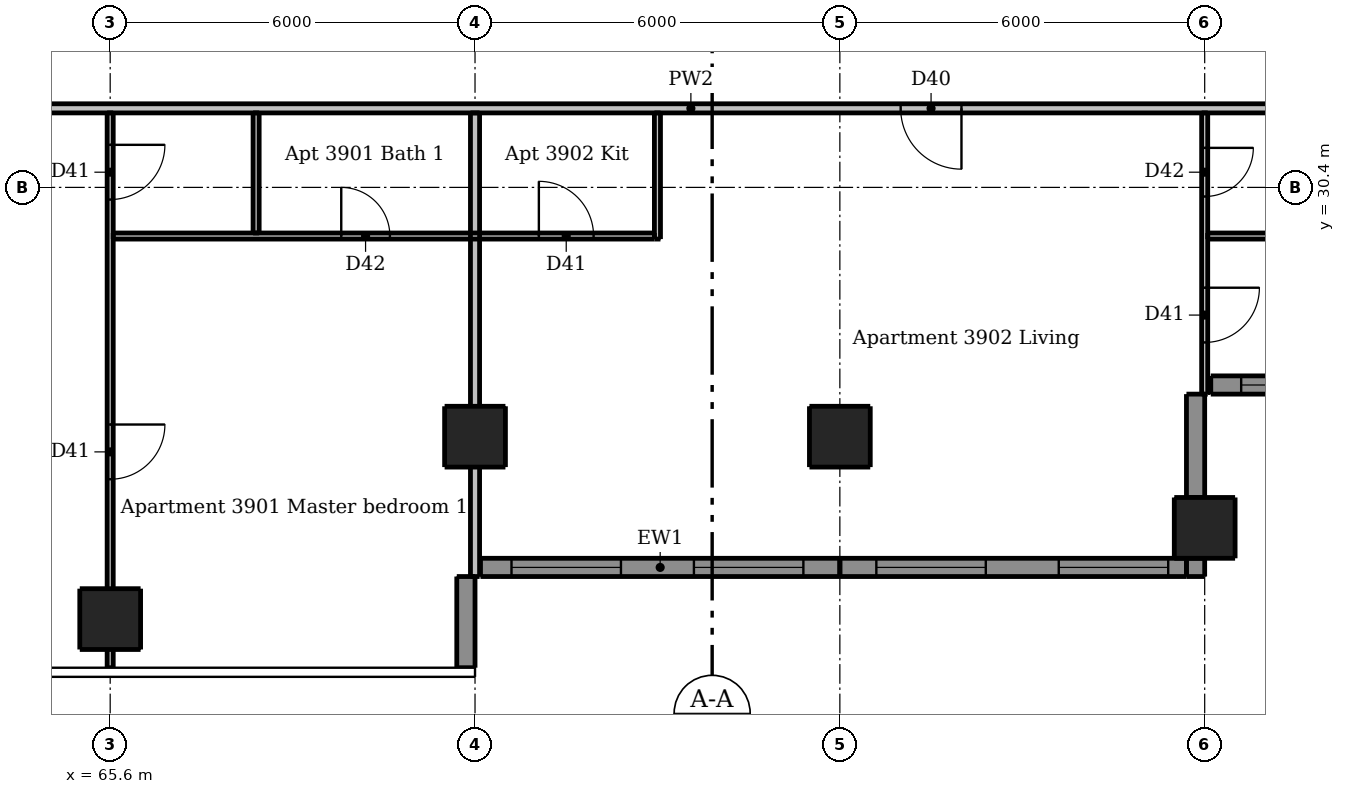
"""IFC4 building model, lengths in metres.
Left out: names, types, materials, properties, quantities, classifications, styles, units other than length and angle.
Written with IfcOpenShell. Run it as: python <this file> out.ifc"""

import sys

from ifc_helpers import new_model, si_unit, direction, frame, frame_2d, origin, origin_2d, place, context, subcontext, project, spatial, rectangle, extrude, element, fill, save


model = new_model("IFC4")
c1 = context("Model", 3, precision=1e-05, world=origin(), true_north=direction((0.0, 1.0)))
c2 = subcontext(c1, "Body", "Model", "MODEL_VIEW")
j1 = project(units=[si_unit("LENGTHUNIT", "METRE"), si_unit("PLANEANGLEUNIT", "RADIAN")], contexts=[c1])
p1 = place(None, origin())
s1 = spatial("IfcSite", under=j1, at=p1, CompositionType="ELEMENT")
p2 = place(p1, origin())
s2 = spatial("IfcBuilding", under=s1, at=p2, CompositionType="ELEMENT")
p3 = place(p2, frame((0.0, 0.0, 147.1)))
s3 = spatial("IfcBuildingStorey", under=s2, at=p3, CompositionType="ELEMENT", Elevation=147.1)
for number, where, z_axis, x_axis in (
    (1, (65.6, 23.3, 0.0), (0.0, 0.0, 1.0), (1.0, 0.0, 0.0)),
    (2, (71.6, 26.3, 0.0), (0.0, 0.0, 1.0), (1.0, 0.0, 0.0)),
    (3, (77.6, 26.3, 0.0), (0.0, 0.0, 1.0), (1.0, 0.0, 0.0)),
):
    element("IfcColumn", number, at=place(p3, frame(where, z_axis=z_axis, x_axis=x_axis)), inside=s3, PredefinedType="COLUMN", context=c2, shape_type="SweptSolid", body=[
        extrude(rectangle(XDim=1.0, YDim=1.0, at=origin_2d()), origin(), (0.0, 0.0, 1.0), 3.0),
    ])
p4 = place(p3, frame((83.6, 24.8, 0.0), z_axis=(0.0, 0.0, 1.0), x_axis=(1.0, 0.0, 0.0)))
e4 = element("IfcColumn", 4, at=p4, inside=s3, PredefinedType="COLUMN", context=c2, shape_type="SweptSolid", body=[
    extrude(rectangle(XDim=1.0, YDim=1.0, at=origin_2d()), origin(), (0.0, 0.0, 1.0), 3.3),
])
p5 = place(p3, frame((71.45, 22.5, 0.0), z_axis=(0.0, 0.0, 1.0), x_axis=(0.0, 1.0, 0.0)))
e5 = element("IfcWall", 5, at=p5, inside=s3, PredefinedType="SOLIDWALL", context=c2, shape_type="SweptSolid", body=[
    extrude(rectangle(XDim=1.5, YDim=0.3, at=frame_2d((0.75, 0.0))), origin(), (0.0, 0.0, 1.0), 3.0),
])
p6 = place(p3, frame((83.45, 24.0, 0.0), z_axis=(0.0, 0.0, 1.0), x_axis=(0.0, 1.0, 0.0)))
e6 = element("IfcWall", 6, at=p6, inside=s3, PredefinedType="SOLIDWALL", context=c2, shape_type="SweptSolid", body=[
    extrude(rectangle(XDim=0.3, YDim=0.3, at=frame_2d((0.15, 0.0))), origin(), (0.0, 0.0, 1.0), 3.0),
])
p7 = place(p3, frame((83.45, 25.3, 0.0), z_axis=(0.0, 0.0, 1.0), x_axis=(0.0, 1.0, 0.0)))
e7 = element("IfcWall", 7, at=p7, inside=s3, PredefinedType="SOLIDWALL", context=c2, shape_type="SweptSolid", body=[
    extrude(rectangle(XDim=1.7, YDim=0.3, at=frame_2d((0.85, 0.0))), origin(), (0.0, 0.0, 1.0), 3.0),
])
p8 = place(p3, frame((71.69, 24.15, 0.0), z_axis=(0.0, 0.0, 1.0), x_axis=(1.0, 0.0, 0.0)))
e8 = element("IfcWall", 8, at=p8, inside=s3, PredefinedType="SOLIDWALL", context=c2, shape_type="SweptSolid", body=[
    extrude(rectangle(XDim=5.91, YDim=0.3, at=frame_2d((2.955, 0.0))), origin(), (0.0, 0.0, 1.0), 3.0),
])
p9 = place(p8, frame((0.51, 0.0, 0.15)))
e9 = element("IfcOpeningElement", 9, at=p9, cuts=e8, PredefinedType="OPENING", context=c2, shape_type="SweptSolid", body=[
    extrude(rectangle(XDim=1.8, YDim=2.1, at=frame_2d((0.9, 1.05))), frame((0.0, 0.16, 0.0), z_axis=(0.0, -1.0, 0.0), x_axis=(1.0, 0.0, 0.0)), (0.0, 0.0, 1.0), 0.32),
])
p10 = place(p8, frame((3.51, 0.0, 0.15)))
e10 = element("IfcOpeningElement", 10, at=p10, cuts=e8, PredefinedType="OPENING", context=c2, shape_type="SweptSolid", body=[
    extrude(rectangle(XDim=1.8, YDim=2.1, at=frame_2d((0.9, 1.05))), frame((0.0, 0.16, 0.0), z_axis=(0.0, -1.0, 0.0), x_axis=(1.0, 0.0, 0.0)), (0.0, 0.0, 1.0), 0.32),
])
p11 = place(p3, frame((77.6, 24.15, 0.0), z_axis=(0.0, 0.0, 1.0), x_axis=(1.0, 0.0, 0.0)))
e11 = element("IfcWall", 11, at=p11, inside=s3, PredefinedType="SOLIDWALL", context=c2, shape_type="SweptSolid", body=[
    extrude(rectangle(XDim=5.7, YDim=0.3, at=frame_2d((2.85, 0.0))), origin(), (0.0, 0.0, 1.0), 3.0),
])
p12 = place(p11, frame((0.6, 0.0, 0.15)))
e12 = element("IfcOpeningElement", 12, at=p12, cuts=e11, PredefinedType="OPENING", context=c2, shape_type="SweptSolid", body=[
    extrude(rectangle(XDim=1.8, YDim=2.1, at=frame_2d((0.9, 1.05))), frame((0.0, 0.16, 0.0), z_axis=(0.0, -1.0, 0.0), x_axis=(1.0, 0.0, 0.0)), (0.0, 0.0, 1.0), 0.32),
])
p13 = place(p11, frame((3.6, 0.0, 0.15)))
e13 = element("IfcOpeningElement", 13, at=p13, cuts=e11, PredefinedType="OPENING", context=c2, shape_type="SweptSolid", body=[
    extrude(rectangle(XDim=1.8, YDim=2.1, at=frame_2d((0.9, 1.05))), frame((0.0, 0.16, 0.0), z_axis=(0.0, -1.0, 0.0), x_axis=(1.0, 0.0, 0.0)), (0.0, 0.0, 1.0), 0.32),
])
p14 = place(p3, frame((83.7, 27.15, 0.0), z_axis=(0.0, 0.0, 1.0), x_axis=(1.0, 0.0, 0.0)))
e14 = element("IfcWall", 14, at=p14, inside=s3, PredefinedType="SOLIDWALL", context=c2, shape_type="SweptSolid", body=[
    extrude(rectangle(XDim=5.79, YDim=0.3, at=frame_2d((2.895, 0.0))), origin(), (0.0, 0.0, 1.0), 3.0),
])
p15 = place(p14, frame((0.5, 0.0, 0.15)))
e15 = element("IfcOpeningElement", 15, at=p15, cuts=e14, PredefinedType="OPENING", context=c2, shape_type="SweptSolid", body=[
    extrude(rectangle(XDim=1.8, YDim=2.1, at=frame_2d((0.9, 1.05))), frame((0.0, 0.16, 0.0), z_axis=(0.0, -1.0, 0.0), x_axis=(1.0, 0.0, 0.0)), (0.0, 0.0, 1.0), 0.32),
])
p16 = place(p14, frame((3.5, 0.0, 0.15)))
e16 = element("IfcOpeningElement", 16, at=p16, cuts=e14, PredefinedType="OPENING", context=c2, shape_type="SweptSolid", body=[
    extrude(rectangle(XDim=1.8, YDim=2.1, at=frame_2d((0.9, 1.05))), frame((0.0, 0.16, 0.0), z_axis=(0.0, -1.0, 0.0), x_axis=(1.0, 0.0, 0.0)), (0.0, 0.0, 1.0), 0.32),
])
p17 = place(p3, frame((65.6, 31.625, 0.0), z_axis=(0.0, 0.0, 1.0), x_axis=(0.0, -1.0, 0.0)))
e17 = element("IfcWall", 17, at=p17, inside=s3, PredefinedType="PARTITIONING", context=c2, shape_type="SweptSolid", body=[
    extrude(rectangle(XDim=9.125, YDim=0.1, at=frame_2d((4.562, 0.0))), origin(), (0.0, 0.0, 1.0), 2.466),
])
p18 = place(p17, frame((0.525, 0.0, 0.0)))
e18 = element("IfcOpeningElement", 18, at=p18, cuts=e17, PredefinedType="OPENING", context=c2, shape_type="SweptSolid", body=[
    extrude(rectangle(XDim=0.9, YDim=2.1, at=frame_2d((0.45, 1.05))), frame((0.0, 0.06, 0.0), z_axis=(0.0, -1.0, 0.0), x_axis=(1.0, 0.0, 0.0)), (0.0, 0.0, 1.0), 0.12),
])
p19 = place(p17, frame((5.125, 0.0, 0.0)))
e19 = element("IfcOpeningElement", 19, at=p19, cuts=e17, PredefinedType="OPENING", context=c2, shape_type="SweptSolid", body=[
    extrude(rectangle(XDim=0.9, YDim=2.1, at=frame_2d((0.45, 1.05))), frame((0.0, 0.06, 0.0), z_axis=(0.0, -1.0, 0.0), x_axis=(1.0, 0.0, 0.0)), (0.0, 0.0, 1.0), 0.12),
])
p20 = place(p3, frame((68.0, 29.65, 0.0), z_axis=(0.0, 0.0, 1.0), x_axis=(0.0, 1.0, 0.0)))
e20 = element("IfcWall", 20, at=p20, inside=s3, PredefinedType="PARTITIONING", context=c2, shape_type="SweptSolid", body=[
    extrude(rectangle(XDim=1.975, YDim=0.1, at=frame_2d((0.988, 0.0))), origin(), (0.0, 0.0, 1.0), 3.0),
])
p21 = place(p3, frame((74.6, 29.55, 0.0), z_axis=(0.0, 0.0, 1.0), x_axis=(0.0, 1.0, 0.0)))
e21 = element("IfcWall", 21, at=p21, inside=s3, PredefinedType="PARTITIONING", context=c2, shape_type="SweptSolid", body=[
    extrude(rectangle(XDim=2.075, YDim=0.1, at=frame_2d((1.038, 0.0))), origin(), (0.0, 0.0, 1.0), 3.0),
])
p22 = place(p3, frame((83.6, 31.625, 0.0), z_axis=(0.0, 0.0, 1.0), x_axis=(0.0, -1.0, 0.0)))
e22 = element("IfcWall", 22, at=p22, inside=s3, PredefinedType="PARTITIONING", context=c2, shape_type="SweptSolid", body=[
    extrude(rectangle(XDim=4.625, YDim=0.1, at=frame_2d((2.312, 0.0))), origin(), (0.0, 0.0, 1.0), 2.54),
])
p23 = place(p22, frame((2.875, 0.0, 0.0)))
e23 = element("IfcOpeningElement", 23, at=p23, cuts=e22, PredefinedType="OPENING", context=c2, shape_type="SweptSolid", body=[
    extrude(rectangle(XDim=0.9, YDim=2.1, at=frame_2d((0.45, 1.05))), frame((0.0, 0.06, 0.0), z_axis=(0.0, -1.0, 0.0), x_axis=(1.0, 0.0, 0.0)), (0.0, 0.0, 1.0), 0.12),
])
p24 = place(p22, frame((0.575, 0.0, 0.0)))
e24 = element("IfcOpeningElement", 24, at=p24, cuts=e22, PredefinedType="OPENING", context=c2, shape_type="SweptSolid", body=[
    extrude(rectangle(XDim=0.8, YDim=2.1, at=frame_2d((0.4, 1.05))), frame((0.0, 0.06, 0.0), z_axis=(0.0, -1.0, 0.0), x_axis=(1.0, 0.0, 0.0)), (0.0, 0.0, 1.0), 0.12),
])
p25 = place(p3, frame((65.65, 29.6, 0.0), z_axis=(0.0, 0.0, 1.0), x_axis=(1.0, 0.0, 0.0)))
e25 = element("IfcWall", 25, at=p25, inside=s3, PredefinedType="PARTITIONING", context=c2, shape_type="SweptSolid", body=[
    extrude(rectangle(XDim=8.9, YDim=0.1, at=frame_2d((4.45, 0.0))), origin(), (0.0, 0.0, 1.0), 3.0),
])
p26 = place(p25, frame((3.75, 0.0, 0.0)))
e26 = element("IfcOpeningElement", 26, at=p26, cuts=e25, PredefinedType="OPENING", context=c2, shape_type="SweptSolid", body=[
    extrude(rectangle(XDim=0.8, YDim=2.1, at=frame_2d((0.4, 1.05))), frame((0.0, 0.06, 0.0), z_axis=(0.0, -1.0, 0.0), x_axis=(1.0, 0.0, 0.0)), (0.0, 0.0, 1.0), 0.12),
])
p27 = place(p25, frame((7.0, 0.0, 0.0)))
e27 = element("IfcOpeningElement", 27, at=p27, cuts=e25, PredefinedType="OPENING", context=c2, shape_type="SweptSolid", body=[
    extrude(rectangle(XDim=0.9, YDim=2.1, at=frame_2d((0.45, 1.05))), frame((0.0, 0.06, 0.0), z_axis=(0.0, -1.0, 0.0), x_axis=(1.0, 0.0, 0.0)), (0.0, 0.0, 1.0), 0.12),
])
p28 = place(p3, frame((83.65, 29.6, 0.0), z_axis=(0.0, 0.0, 1.0), x_axis=(1.0, 0.0, 0.0)))
e28 = element("IfcWall", 28, at=p28, inside=s3, PredefinedType="PARTITIONING", context=c2, shape_type="SweptSolid", body=[
    extrude(rectangle(XDim=3.5, YDim=0.1, at=frame_2d((1.75, 0.0))), origin(), (0.0, 0.0, 1.0), 3.0),
])
p29 = place(p3, frame((71.6, 24.0, 0.0), z_axis=(0.0, 0.0, 1.0), x_axis=(0.0, 1.0, 0.0)))
e29 = element("IfcWall", 29, at=p29, inside=s3, PredefinedType="PARTITIONING", context=c2, shape_type="SweptSolid", body=[
    extrude(rectangle(XDim=7.625, YDim=0.15, at=frame_2d((3.812, 0.0))), origin(), (0.0, 0.0, 1.0), 2.54),
])
p30 = place(p3, frame((89.525, 31.7, 0.0), z_axis=(0.0, 0.0, 1.0), x_axis=(-1.0, 0.0, 0.0)))
e30 = element("IfcWall", 30, at=p30, inside=s3, PredefinedType="PARTITIONING", context=c2, shape_type="SweptSolid", body=[
    extrude(rectangle(XDim=28.75, YDim=0.15, at=frame_2d((14.375, 0.0))), origin(), (0.0, 0.0, 1.0), 3.0),
])
p31 = place(p30, frame((25.875, 0.0, 0.0)))
e31 = element("IfcOpeningElement", 31, at=p31, cuts=e30, PredefinedType="OPENING", context=c2, shape_type="SweptSolid", body=[
    extrude(rectangle(XDim=1.0, YDim=2.1, at=frame_2d((0.5, 1.05))), frame((0.0, 0.085, 0.0), z_axis=(0.0, -1.0, 0.0), x_axis=(1.0, 0.0, 0.0)), (0.0, 0.0, 1.0), 0.17),
])
p32 = place(p30, frame((9.925, 0.0, 0.0)))
e32 = element("IfcOpeningElement", 32, at=p32, cuts=e30, PredefinedType="OPENING", context=c2, shape_type="SweptSolid", body=[
    extrude(rectangle(XDim=1.0, YDim=2.1, at=frame_2d((0.5, 1.05))), frame((0.0, 0.085, 0.0), z_axis=(0.0, -1.0, 0.0), x_axis=(1.0, 0.0, 0.0)), (0.0, 0.0, 1.0), 0.17),
])
p33 = place(p9, origin())
e33 = element("IfcWindow", 33, at=p33, inside=s3, PartitioningType="DOUBLE_PANEL_VERTICAL", PredefinedType="WINDOW", context=c2, shape_type="SweptSolid", body=[
    extrude(rectangle(XDim=1.8, YDim=2.1, at=frame_2d((0.9, 1.05))), frame((0.0, 0.03, 0.0), z_axis=(0.0, -1.0, 0.0), x_axis=(1.0, 0.0, 0.0)), (0.0, 0.0, 1.0), 0.06),
])
fill(e9, e33)
p34 = place(p10, origin())
e34 = element("IfcWindow", 34, at=p34, inside=s3, PartitioningType="DOUBLE_PANEL_VERTICAL", PredefinedType="WINDOW", context=c2, shape_type="SweptSolid", body=[
    extrude(rectangle(XDim=1.8, YDim=2.1, at=frame_2d((0.9, 1.05))), frame((0.0, 0.03, 0.0), z_axis=(0.0, -1.0, 0.0), x_axis=(1.0, 0.0, 0.0)), (0.0, 0.0, 1.0), 0.06),
])
fill(e10, e34)
p35 = place(p12, origin())
e35 = element("IfcWindow", 35, at=p35, inside=s3, PartitioningType="DOUBLE_PANEL_VERTICAL", PredefinedType="WINDOW", context=c2, shape_type="SweptSolid", body=[
    extrude(rectangle(XDim=1.8, YDim=2.1, at=frame_2d((0.9, 1.05))), frame((0.0, 0.03, 0.0), z_axis=(0.0, -1.0, 0.0), x_axis=(1.0, 0.0, 0.0)), (0.0, 0.0, 1.0), 0.06),
])
fill(e12, e35)
p36 = place(p13, origin())
e36 = element("IfcWindow", 36, at=p36, inside=s3, PartitioningType="DOUBLE_PANEL_VERTICAL", PredefinedType="WINDOW", context=c2, shape_type="SweptSolid", body=[
    extrude(rectangle(XDim=1.8, YDim=2.1, at=frame_2d((0.9, 1.05))), frame((0.0, 0.03, 0.0), z_axis=(0.0, -1.0, 0.0), x_axis=(1.0, 0.0, 0.0)), (0.0, 0.0, 1.0), 0.06),
])
fill(e13, e36)
p37 = place(p15, origin())
e37 = element("IfcWindow", 37, at=p37, inside=s3, PartitioningType="DOUBLE_PANEL_VERTICAL", PredefinedType="WINDOW", context=c2, shape_type="SweptSolid", body=[
    extrude(rectangle(XDim=1.8, YDim=2.1, at=frame_2d((0.9, 1.05))), frame((0.0, 0.03, 0.0), z_axis=(0.0, -1.0, 0.0), x_axis=(1.0, 0.0, 0.0)), (0.0, 0.0, 1.0), 0.06),
])
fill(e15, e37)
p38 = place(p18, origin())
e38 = element("IfcDoor", 38, at=p38, inside=s3, OperationType="SINGLE_SWING_LEFT", PredefinedType="DOOR", context=c2, shape_type="SweptSolid", body=[
    extrude(rectangle(XDim=0.9, YDim=2.1, at=frame_2d((0.45, 1.05))), frame((0.0, 0.025, 0.0), z_axis=(0.0, -1.0, 0.0), x_axis=(1.0, 0.0, 0.0)), (0.0, 0.0, 1.0), 0.05),
])
fill(e18, e38)
p39 = place(p19, origin())
e39 = element("IfcDoor", 39, at=p39, inside=s3, OperationType="SINGLE_SWING_LEFT", PredefinedType="DOOR", context=c2, shape_type="SweptSolid", body=[
    extrude(rectangle(XDim=0.9, YDim=2.1, at=frame_2d((0.45, 1.05))), frame((0.0, 0.025, 0.0), z_axis=(0.0, -1.0, 0.0), x_axis=(1.0, 0.0, 0.0)), (0.0, 0.0, 1.0), 0.05),
])
fill(e19, e39)
p40 = place(p26, origin())
e40 = element("IfcDoor", 40, at=p40, inside=s3, OperationType="SINGLE_SWING_LEFT", PredefinedType="DOOR", context=c2, shape_type="SweptSolid", body=[
    extrude(rectangle(XDim=0.8, YDim=2.1, at=frame_2d((0.4, 1.05))), frame((0.0, 0.025, 0.0), z_axis=(0.0, -1.0, 0.0), x_axis=(1.0, 0.0, 0.0)), (0.0, 0.0, 1.0), 0.05),
])
fill(e26, e40)
p41 = place(p32, origin())
e41 = element("IfcDoor", 41, at=p41, inside=s3, OperationType="SINGLE_SWING_LEFT", PredefinedType="DOOR", context=c2, shape_type="SweptSolid", body=[
    extrude(rectangle(XDim=1.0, YDim=2.1, at=frame_2d((0.5, 1.05))), frame((0.0, 0.025, 0.0), z_axis=(0.0, -1.0, 0.0), x_axis=(1.0, 0.0, 0.0)), (0.0, 0.0, 1.0), 0.05),
])
fill(e32, e41)
p42 = place(p27, origin())
e42 = element("IfcDoor", 42, at=p42, inside=s3, OperationType="SINGLE_SWING_LEFT", PredefinedType="DOOR", context=c2, shape_type="SweptSolid", body=[
    extrude(rectangle(XDim=0.9, YDim=2.1, at=frame_2d((0.45, 1.05))), frame((0.0, 0.025, 0.0), z_axis=(0.0, -1.0, 0.0), x_axis=(1.0, 0.0, 0.0)), (0.0, 0.0, 1.0), 0.05),
])
fill(e27, e42)
p43 = place(p23, origin())
e43 = element("IfcDoor", 43, at=p43, inside=s3, OperationType="SINGLE_SWING_LEFT", PredefinedType="DOOR", context=c2, shape_type="SweptSolid", body=[
    extrude(rectangle(XDim=0.9, YDim=2.1, at=frame_2d((0.45, 1.05))), frame((0.0, 0.025, 0.0), z_axis=(0.0, -1.0, 0.0), x_axis=(1.0, 0.0, 0.0)), (0.0, 0.0, 1.0), 0.05),
])
fill(e23, e43)
p44 = place(p24, origin())
e44 = element("IfcDoor", 44, at=p44, inside=s3, OperationType="SINGLE_SWING_LEFT", PredefinedType="DOOR", context=c2, shape_type="SweptSolid", body=[
    extrude(rectangle(XDim=0.8, YDim=2.1, at=frame_2d((0.4, 1.05))), frame((0.0, 0.025, 0.0), z_axis=(0.0, -1.0, 0.0), x_axis=(1.0, 0.0, 0.0)), (0.0, 0.0, 1.0), 0.05),
])
fill(e24, e44)
save(model, sys.argv[1])
